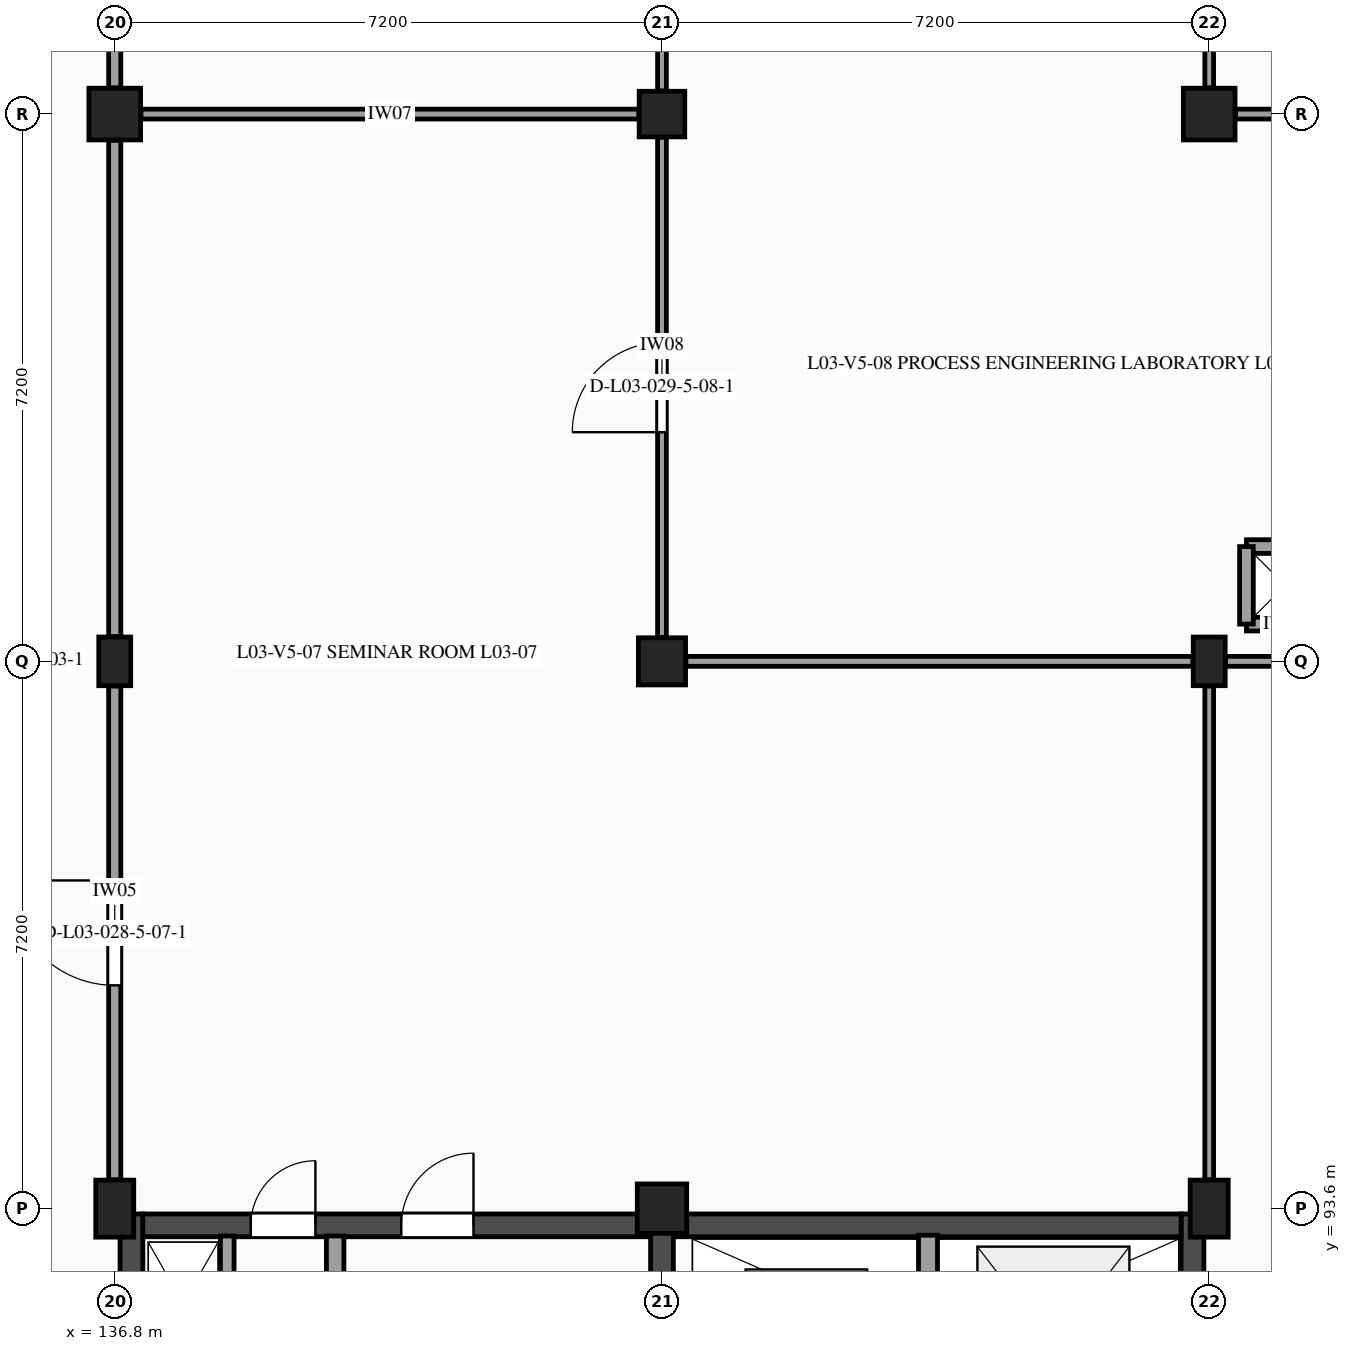
"""IFC4 building model, lengths in metres.
Left out: names, types, materials, properties, quantities, classifications, styles, units other than length and angle.
Written with IfcOpenShell. Run it as: python <this file> out.ifc"""

import sys

from ifc_helpers import new_model, si_unit, direction, frame, frame_2d, origin, origin_2d, place, context, subcontext, project, spatial, rectangle, extrude, element, fill, save


model = new_model("IFC4")
c1 = context("Model", 3, precision=1e-05, world=origin(), true_north=direction((0.0, 1.0)))
c2 = subcontext(c1, "Body", "Model", "MODEL_VIEW")
j1 = project(units=[si_unit("LENGTHUNIT", "METRE"), si_unit("PLANEANGLEUNIT", "RADIAN")], contexts=[c1])
p1 = place(None, origin())
s1 = spatial("IfcSite", under=j1, at=p1, CompositionType="ELEMENT")
p2 = place(p1, origin())
s2 = spatial("IfcBuilding", under=s1, at=p2, CompositionType="ELEMENT")
p3 = place(p2, frame((0.0, 0.0, 14.4)))
s3 = spatial("IfcBuildingStorey", under=s2, at=p3, CompositionType="ELEMENT", Elevation=14.4)
p4 = place(p3, frame((136.8, 93.6, 0.0), z_axis=(0.0, 0.0, 1.0), x_axis=(1.0, 0.0, 0.0)))
e1 = element("IfcColumn", 1, at=p4, inside=s3, PredefinedType="COLUMN", context=c2, shape_type="SweptSolid", body=[
    extrude(rectangle(XDim=0.5, YDim=0.75, at=origin_2d()), origin(), (0.0, 0.0, 1.0), 4.2),
])
p5 = place(p3, frame((136.8, 100.8, 0.0), z_axis=(0.0, 0.0, 1.0), x_axis=(1.0, 0.0, 0.0)))
e2 = element("IfcColumn", 2, at=p5, inside=s3, PredefinedType="PILASTER", context=c2, shape_type="SweptSolid", body=[
    extrude(rectangle(XDim=0.42, YDim=0.64, at=origin_2d()), origin(), (0.0, 0.0, 1.0), 4.2),
])
p6 = place(p3, frame((136.8, 108.0, 0.0), z_axis=(0.0, 0.0, 1.0), x_axis=(1.0, 0.0, 0.0)))
e3 = element("IfcColumn", 3, at=p6, inside=s3, PredefinedType="COLUMN", context=c2, shape_type="SweptSolid", body=[
    extrude(rectangle(XDim=0.68, YDim=0.68, at=origin_2d()), origin(), (0.0, 0.0, 1.0), 4.2),
])
p7 = place(p3, frame((144.0, 93.6, 0.0), z_axis=(0.0, 0.0, 1.0), x_axis=(1.0, 0.0, 0.0)))
e4 = element("IfcColumn", 4, at=p7, inside=s3, PredefinedType="COLUMN", context=c2, shape_type="SweptSolid", body=[
    extrude(rectangle(XDim=0.65, YDim=0.65, at=origin_2d()), origin(), (0.0, 0.0, 1.0), 4.2),
])
p8 = place(p3, frame((144.0, 100.8, 0.0), z_axis=(0.0, 0.0, 1.0), x_axis=(1.0, 0.0, 0.0)))
e5 = element("IfcColumn", 5, at=p8, inside=s3, PredefinedType="COLUMN", context=c2, shape_type="SweptSolid", body=[
    extrude(rectangle(XDim=0.62, YDim=0.62, at=origin_2d()), origin(), (0.0, 0.0, 1.0), 4.2),
])
p9 = place(p3, frame((144.0, 108.0, 0.0), z_axis=(0.0, 0.0, 1.0), x_axis=(1.0, 0.0, 0.0)))
e6 = element("IfcColumn", 6, at=p9, inside=s3, PredefinedType="COLUMN", context=c2, shape_type="SweptSolid", body=[
    extrude(rectangle(XDim=0.6, YDim=0.6, at=origin_2d()), origin(), (0.0, 0.0, 1.0), 4.2),
])
p10 = place(p3, frame((151.2, 93.6, 0.0), z_axis=(0.0, 0.0, 1.0), x_axis=(1.0, 0.0, 0.0)))
e7 = element("IfcColumn", 7, at=p10, inside=s3, PredefinedType="COLUMN", context=c2, shape_type="SweptSolid", body=[
    extrude(rectangle(XDim=0.5, YDim=0.75, at=origin_2d()), origin(), (0.0, 0.0, 1.0), 4.2),
])
p11 = place(p3, frame((151.2, 100.8, 0.0), z_axis=(0.0, 0.0, 1.0), x_axis=(1.0, 0.0, 0.0)))
e8 = element("IfcColumn", 8, at=p11, inside=s3, PredefinedType="PILASTER", context=c2, shape_type="SweptSolid", body=[
    extrude(rectangle(XDim=0.42, YDim=0.64, at=origin_2d()), origin(), (0.0, 0.0, 1.0), 4.2),
])
p12 = place(p3, frame((151.2, 108.0, 0.0), z_axis=(0.0, 0.0, 1.0), x_axis=(1.0, 0.0, 0.0)))
e9 = element("IfcColumn", 9, at=p12, inside=s3, PredefinedType="COLUMN", context=c2, shape_type="SweptSolid", body=[
    extrude(rectangle(XDim=0.68, YDim=0.68, at=origin_2d()), origin(), (0.0, 0.0, 1.0), 4.2),
])
p13 = place(p3, frame((137.02, 93.53, 0.0), z_axis=(0.0, 0.0, 1.0), x_axis=(0.0, -1.0, 0.0)))
e10 = element("IfcWall", 10, at=p13, inside=s3, PredefinedType="SHEAR", context=c2, shape_type="SweptSolid", body=[
    extrude(rectangle(XDim=7.06, YDim=0.3, at=frame_2d((3.53, 0.0))), origin(), (0.0, 0.0, 1.0), 3.94),
])
p14 = place(p3, frame((137.17, 93.38, 0.0), z_axis=(0.0, 0.0, 1.0), x_axis=(1.0, 0.0, 0.0)))
e11 = element("IfcWall", 11, at=p14, inside=s3, PredefinedType="SHEAR", context=c2, shape_type="SweptSolid", body=[
    extrude(rectangle(XDim=6.68, YDim=0.3, at=frame_2d((3.34, 0.0))), origin(), (0.0, 0.0, 1.0), 3.94),
])
p15 = place(p14, frame((1.42, 0.0, 0.0)))
e12 = element("IfcOpeningElement", 12, at=p15, cuts=e11, PredefinedType="OPENING", context=c2, shape_type="SweptSolid", body=[
    extrude(rectangle(XDim=0.85, YDim=2.1, at=frame_2d((0.425, 1.05))), frame((0.0, 0.16, 0.0), z_axis=(0.0, -1.0, 0.0), x_axis=(1.0, 0.0, 0.0)), (0.0, 0.0, 1.0), 0.32),
])
p16 = place(p14, frame((3.4, 0.0, 0.0)))
e13 = element("IfcOpeningElement", 13, at=p16, cuts=e11, PredefinedType="OPENING", context=c2, shape_type="SweptSolid", body=[
    extrude(rectangle(XDim=0.95, YDim=2.15, at=frame_2d((0.475, 1.075))), frame((0.0, 0.16, 0.0), z_axis=(0.0, -1.0, 0.0), x_axis=(1.0, 0.0, 0.0)), (0.0, 0.0, 1.0), 0.32),
])
p17 = place(p3, frame((139.7, 91.5, 0.0), z_axis=(0.0, 0.0, 1.0), x_axis=(0.0, 1.0, 0.0)))
e14 = element("IfcWall", 14, at=p17, inside=s3, PredefinedType="PARTITIONING", context=c2, shape_type="SweptSolid", body=[
    extrude(rectangle(XDim=1.74, YDim=0.23, at=frame_2d((0.87, 0.0))), origin(), (0.0, 0.0, 1.0), 3.94),
])
p18 = place(p3, frame((138.28, 91.48, 0.0), z_axis=(0.0, 0.0, 1.0), x_axis=(0.0, 1.0, 0.0)))
e15 = element("IfcWall", 15, at=p18, inside=s3, PredefinedType="PARTITIONING", context=c2, shape_type="SweptSolid", body=[
    extrude(rectangle(XDim=1.76, YDim=0.18, at=frame_2d((0.88, 0.0))), origin(), (0.0, 0.0, 1.0), 3.94),
])
p19 = place(p3, frame((144.0, 86.47, 0.0), z_axis=(0.0, 0.0, 1.0), x_axis=(0.0, 1.0, 0.0)))
e16 = element("IfcWall", 16, at=p19, inside=s3, PredefinedType="SHEAR", context=c2, shape_type="SweptSolid", body=[
    extrude(rectangle(XDim=7.06, YDim=0.3, at=frame_2d((3.53, 0.0))), origin(), (0.0, 0.0, 1.0), 3.94),
])
p20 = place(p19, frame((1.4, 0.0, 0.0)))
e17 = element("IfcOpeningElement", 17, at=p20, cuts=e16, PredefinedType="OPENING", context=c2, shape_type="SweptSolid", body=[
    extrude(rectangle(XDim=1.8, YDim=2.2, at=frame_2d((0.9, 1.1))), frame((0.0, 0.16, 0.0), z_axis=(0.0, -1.0, 0.0), x_axis=(1.0, 0.0, 0.0)), (0.0, 0.0, 1.0), 0.32),
])
p21 = place(p3, frame((150.98, 86.47, 0.0), z_axis=(0.0, 0.0, 1.0), x_axis=(0.0, 1.0, 0.0)))
e18 = element("IfcWall", 18, at=p21, inside=s3, PredefinedType="SHEAR", context=c2, shape_type="SweptSolid", body=[
    extrude(rectangle(XDim=7.06, YDim=0.3, at=frame_2d((3.53, 0.0))), origin(), (0.0, 0.0, 1.0), 3.94),
])
p22 = place(p3, frame((144.15, 93.38, 0.0), z_axis=(0.0, 0.0, 1.0), x_axis=(1.0, 0.0, 0.0)))
e19 = element("IfcWall", 19, at=p22, inside=s3, PredefinedType="SHEAR", context=c2, shape_type="SweptSolid", body=[
    extrude(rectangle(XDim=6.68, YDim=0.3, at=frame_2d((3.34, 0.0))), origin(), (0.0, 0.0, 1.0), 3.94),
])
p23 = place(p3, frame((147.5, 90.38, 0.0), z_axis=(0.0, 0.0, 1.0), x_axis=(0.0, 1.0, 0.0)))
e20 = element("IfcWall", 20, at=p23, inside=s3, PredefinedType="PARTITIONING", context=c2, shape_type="SweptSolid", body=[
    extrude(rectangle(XDim=2.87, YDim=0.25, at=frame_2d((1.435, 0.0))), origin(), (0.0, 0.0, 1.0), 3.94),
])
for number, where, z_axis, x_axis in (
    (21, (151.69, 101.29, 0.0), (0.0, 0.0, 1.0), (1.0, 0.0, 0.0)),
    (22, (152.71, 102.31, 0.0), (0.0, 0.0, 1.0), (-1.0, 0.0, 0.0)),
    (23, (151.69, 102.31, 0.0), (0.0, 0.0, 1.0), (0.0, -1.0, 0.0)),
):
    element("IfcWall", number, at=place(p3, frame(where, z_axis=z_axis, x_axis=x_axis)), inside=s3, PredefinedType="PARTITIONING", context=c2, shape_type="SweptSolid", body=[
        extrude(rectangle(XDim=1.02, YDim=0.18, at=frame_2d((0.51, 0.0))), origin(), (0.0, 0.0, 1.0), 3.94),
    ])
p24 = place(p3, frame((136.8, 93.98, 0.0), z_axis=(0.0, 0.0, 1.0), x_axis=(0.0, 1.0, 0.0)))
e24 = element("IfcWall", 24, at=p24, inside=s3, PredefinedType="PARTITIONING", context=c2, shape_type="SweptSolid", body=[
    extrude(rectangle(XDim=6.495, YDim=0.16, at=frame_2d((3.248, 0.0))), origin(), (0.0, 0.0, 1.0), 3.23),
])
p25 = place(p24, frame((2.558, 0.0, 0.0)))
e25 = element("IfcOpeningElement", 25, at=p25, cuts=e24, PredefinedType="OPENING", context=c2, shape_type="SweptSolid", body=[
    extrude(rectangle(XDim=1.38, YDim=2.22, at=frame_2d((0.69, 1.11))), frame((0.0, 0.09, 0.0), z_axis=(0.0, -1.0, 0.0), x_axis=(1.0, 0.0, 0.0)), (0.0, 0.0, 1.0), 0.18),
])
p26 = place(p3, frame((136.8, 101.125, 0.0), z_axis=(0.0, 0.0, 1.0), x_axis=(0.0, 1.0, 0.0)))
e26 = element("IfcWall", 26, at=p26, inside=s3, PredefinedType="PARTITIONING", context=c2, shape_type="SweptSolid", body=[
    extrude(rectangle(XDim=6.53, YDim=0.16, at=frame_2d((3.265, 0.0))), origin(), (0.0, 0.0, 1.0), 3.225),
])
p27 = place(p3, frame((136.8, 108.345, 0.0), z_axis=(0.0, 0.0, 1.0), x_axis=(0.0, 1.0, 0.0)))
e27 = element("IfcWall", 27, at=p27, inside=s3, PredefinedType="PARTITIONING", context=c2, shape_type="SweptSolid", body=[
    extrude(rectangle(XDim=6.525, YDim=0.16, at=frame_2d((3.263, 0.0))), origin(), (0.0, 0.0, 1.0), 3.22),
])
p28 = place(p27, frame((2.623, 0.0, 0.0)))
e28 = element("IfcOpeningElement", 28, at=p28, cuts=e27, PredefinedType="OPENING", context=c2, shape_type="SweptSolid", body=[
    extrude(rectangle(XDim=1.28, YDim=2.24, at=frame_2d((0.64, 1.12))), frame((0.0, 0.09, 0.0), z_axis=(0.0, -1.0, 0.0), x_axis=(1.0, 0.0, 0.0)), (0.0, 0.0, 1.0), 0.18),
])
p29 = place(p3, frame((144.0, 101.115, 0.0), z_axis=(0.0, 0.0, 1.0), x_axis=(0.0, 1.0, 0.0)))
e29 = element("IfcWall", 29, at=p29, inside=s3, PredefinedType="PARTITIONING", context=c2, shape_type="SweptSolid", body=[
    extrude(rectangle(XDim=6.58, YDim=0.115, at=frame_2d((3.29, 0.0))), origin(), (0.0, 0.0, 1.0), 3.25),
])
p30 = place(p29, frame((2.7, 0.0, 0.0)))
e30 = element("IfcOpeningElement", 30, at=p30, cuts=e29, PredefinedType="OPENING", context=c2, shape_type="SweptSolid", body=[
    extrude(rectangle(XDim=1.18, YDim=2.18, at=frame_2d((0.59, 1.09))), frame((0.0, 0.067, 0.0), z_axis=(0.0, -1.0, 0.0), x_axis=(1.0, 0.0, 0.0)), (0.0, 0.0, 1.0), 0.135),
])
p31 = place(p3, frame((137.145, 108.0, 0.0), z_axis=(0.0, 0.0, 1.0), x_axis=(1.0, 0.0, 0.0)))
e31 = element("IfcWall", 31, at=p31, inside=s3, PredefinedType="PARTITIONING", context=c2, shape_type="SweptSolid", body=[
    extrude(rectangle(XDim=6.55, YDim=0.13, at=frame_2d((3.275, 0.0))), origin(), (0.0, 0.0, 1.0), 3.2),
])
p32 = place(p3, frame((144.0, 108.305, 0.0), z_axis=(0.0, 0.0, 1.0), x_axis=(0.0, 1.0, 0.0)))
e32 = element("IfcWall", 32, at=p32, inside=s3, PredefinedType="PARTITIONING", context=c2, shape_type="SweptSolid", body=[
    extrude(rectangle(XDim=6.515, YDim=0.115, at=frame_2d((3.258, 0.0))), origin(), (0.0, 0.0, 1.0), 3.245),
])
p33 = place(p3, frame((151.2, 93.98, 0.0), z_axis=(0.0, 0.0, 1.0), x_axis=(0.0, 1.0, 0.0)))
e33 = element("IfcWall", 33, at=p33, inside=s3, PredefinedType="PARTITIONING", context=c2, shape_type="SweptSolid", body=[
    extrude(rectangle(XDim=6.495, YDim=0.115, at=frame_2d((3.248, 0.0))), origin(), (0.0, 0.0, 1.0), 3.255),
])
p34 = place(p3, frame((144.315, 100.8, 0.0), z_axis=(0.0, 0.0, 1.0), x_axis=(1.0, 0.0, 0.0)))
e34 = element("IfcWall", 34, at=p34, inside=s3, PredefinedType="PARTITIONING", context=c2, shape_type="SweptSolid", body=[
    extrude(rectangle(XDim=6.67, YDim=0.13, at=frame_2d((3.335, 0.0))), origin(), (0.0, 0.0, 1.0), 3.215),
])
p35 = place(p3, frame((151.2, 108.345, 0.0), z_axis=(0.0, 0.0, 1.0), x_axis=(0.0, 1.0, 0.0)))
e35 = element("IfcWall", 35, at=p35, inside=s3, PredefinedType="PARTITIONING", context=c2, shape_type="SweptSolid", body=[
    extrude(rectangle(XDim=6.525, YDim=0.115, at=frame_2d((3.263, 0.0))), origin(), (0.0, 0.0, 1.0), 3.245),
])
p36 = place(p35, frame((2.712, 0.0, 0.0)))
e36 = element("IfcOpeningElement", 36, at=p36, cuts=e35, PredefinedType="OPENING", context=c2, shape_type="SweptSolid", body=[
    extrude(rectangle(XDim=1.1, YDim=2.15, at=frame_2d((0.55, 1.075))), frame((0.0, 0.067, 0.0), z_axis=(0.0, -1.0, 0.0), x_axis=(1.0, 0.0, 0.0)), (0.0, 0.0, 1.0), 0.135),
])
p37 = place(p3, frame((151.415, 100.8, 0.0), z_axis=(0.0, 0.0, 1.0), x_axis=(1.0, 0.0, 0.0)))
e37 = element("IfcWall", 37, at=p37, inside=s3, PredefinedType="PARTITIONING", context=c2, shape_type="SweptSolid", body=[
    extrude(rectangle(XDim=6.67, YDim=0.13, at=frame_2d((3.335, 0.0))), origin(), (0.0, 0.0, 1.0), 3.22),
])
p38 = place(p3, frame((151.545, 108.0, 0.0), z_axis=(0.0, 0.0, 1.0), x_axis=(1.0, 0.0, 0.0)))
e38 = element("IfcWall", 38, at=p38, inside=s3, PredefinedType="PARTITIONING", context=c2, shape_type="SweptSolid", body=[
    extrude(rectangle(XDim=6.55, YDim=0.13, at=frame_2d((3.275, 0.0))), origin(), (0.0, 0.0, 1.0), 3.22),
])
p39 = place(p15, origin())
e39 = element("IfcDoor", 39, at=p39, inside=s3, OperationType="SINGLE_SWING_RIGHT", PredefinedType="DOOR", context=c2, shape_type="SweptSolid", body=[
    extrude(rectangle(XDim=0.85, YDim=2.1, at=frame_2d((0.425, 1.05))), frame((0.0, 0.025, 0.0), z_axis=(0.0, -1.0, 0.0), x_axis=(1.0, 0.0, 0.0)), (0.0, 0.0, 1.0), 0.05),
])
fill(e12, e39)
p40 = place(p16, origin())
e40 = element("IfcDoor", 40, at=p40, inside=s3, OperationType="SINGLE_SWING_RIGHT", PredefinedType="DOOR", context=c2, shape_type="SweptSolid", body=[
    extrude(rectangle(XDim=0.95, YDim=2.15, at=frame_2d((0.475, 1.075))), frame((0.0, 0.025, 0.0), z_axis=(0.0, -1.0, 0.0), x_axis=(1.0, 0.0, 0.0)), (0.0, 0.0, 1.0), 0.05),
])
fill(e13, e40)
p41 = place(p25, origin())
e41 = element("IfcDoor", 41, at=p41, inside=s3, OperationType="SINGLE_SWING_RIGHT", PredefinedType="DOOR", context=c2, shape_type="SweptSolid", body=[
    extrude(rectangle(XDim=1.38, YDim=2.22, at=frame_2d((0.69, 1.11))), frame((0.0, 0.025, 0.0), z_axis=(0.0, -1.0, 0.0), x_axis=(1.0, 0.0, 0.0)), (0.0, 0.0, 1.0), 0.05),
])
fill(e25, e41)
p42 = place(p30, origin())
e42 = element("IfcDoor", 42, at=p42, inside=s3, OperationType="SINGLE_SWING_LEFT", PredefinedType="DOOR", context=c2, shape_type="SweptSolid", body=[
    extrude(rectangle(XDim=1.18, YDim=2.18, at=frame_2d((0.59, 1.09))), frame((0.0, 0.025, 0.0), z_axis=(0.0, -1.0, 0.0), x_axis=(1.0, 0.0, 0.0)), (0.0, 0.0, 1.0), 0.05),
])
fill(e30, e42)
save(model, sys.argv[1])
